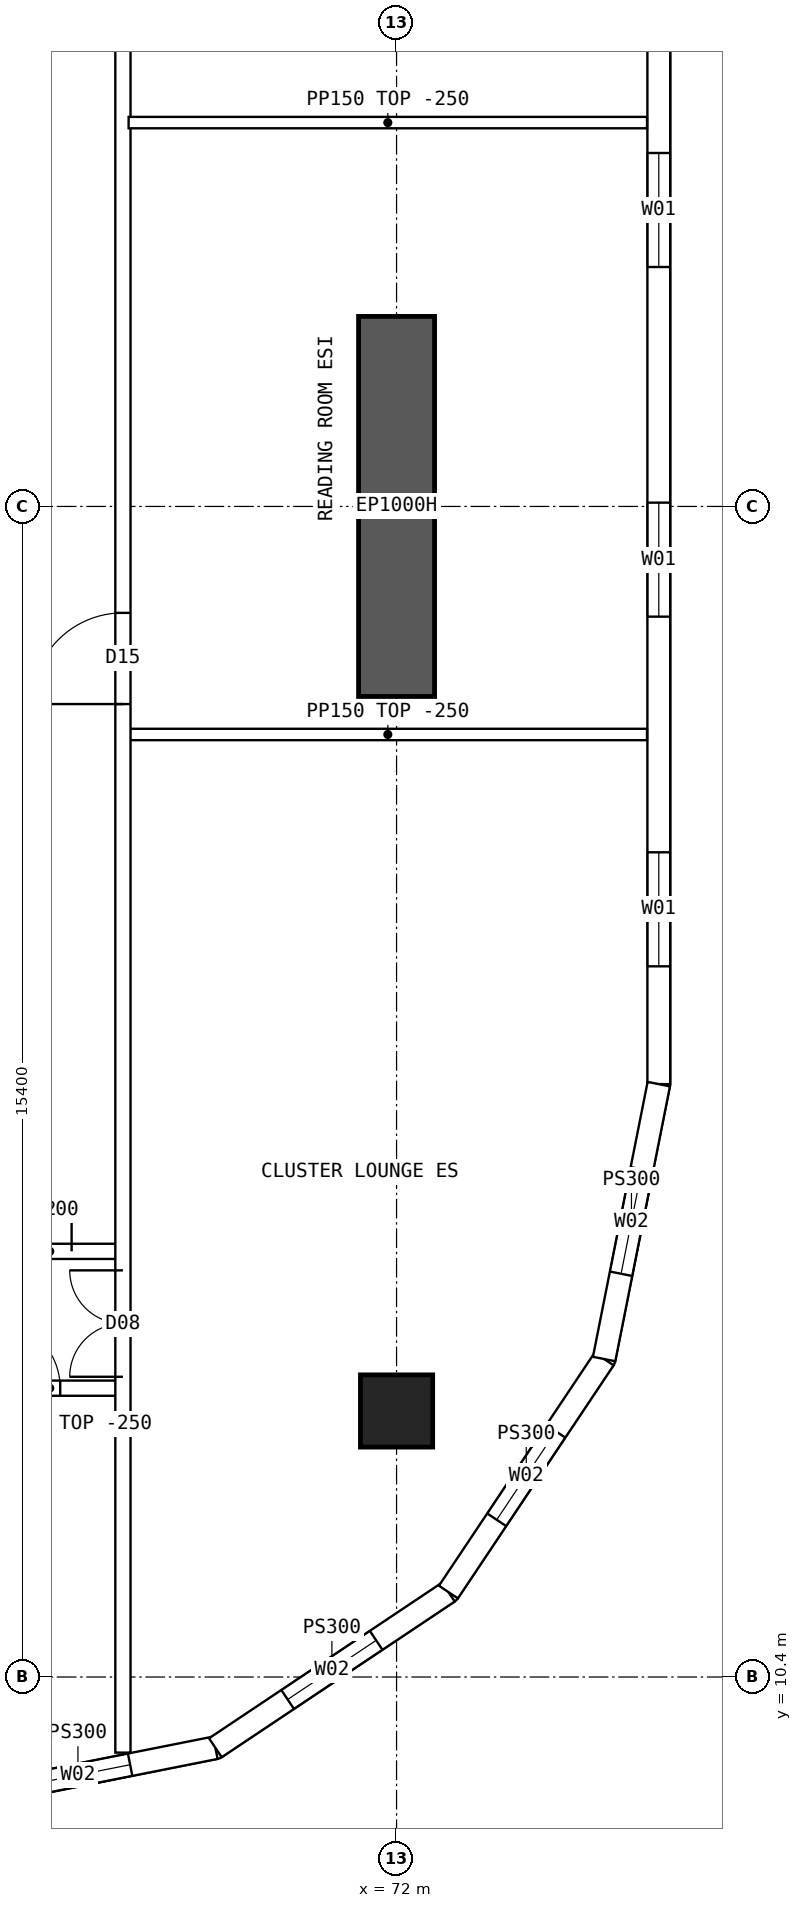
"""IFC4 building model, lengths in metres.
Left out: names, types, materials, properties, quantities, classifications, styles, units other than length and angle.
Written with IfcOpenShell. Run it as: python <this file> out.ifc"""

import sys

from ifc_helpers import new_model, si_unit, direction, frame, frame_2d, origin, origin_2d, place, context, subcontext, project, spatial, polyline, rectangle, hollow_rectangle, outline, extrude, element, fill, save


model = new_model("IFC4")
c1 = context("Model", 3, precision=1e-05, world=origin(), true_north=direction((0.0, 1.0)))
c2 = subcontext(c1, "Body", "Model", "MODEL_VIEW")
j1 = project(units=[si_unit("LENGTHUNIT", "METRE"), si_unit("PLANEANGLEUNIT", "RADIAN")], contexts=[c1])
p1 = place(None, origin())
s1 = spatial("IfcSite", under=j1, at=p1, CompositionType="ELEMENT")
p2 = place(p1, origin())
s2 = spatial("IfcBuilding", under=s1, at=p2, CompositionType="ELEMENT")
p3 = place(p2, frame((0.0, 0.0, 121.9)))
s3 = spatial("IfcBuildingStorey", under=s2, at=p3, CompositionType="ELEMENT", Elevation=121.9)
p4 = place(p3, frame((72.0, 13.9, 0.0), z_axis=(0.0, 0.0, 1.0), x_axis=(1.0, 0.0, 0.0)))
e1 = element("IfcColumn", 1, at=p4, inside=s3, PredefinedType="COLUMN", context=c2, shape_type="SweptSolid", body=[
    extrude(hollow_rectangle(XDim=0.95, YDim=0.95, WallThickness=0.095, at=origin_2d()), origin(), (0.0, 0.0, 1.0), 3.75),
])
p5 = place(p3, frame((72.0, 23.3, 0.0), z_axis=(0.0, 0.0, 1.0), x_axis=(0.0, 1.0, 0.0)))
e2 = element("IfcWall", 2, at=p5, inside=s3, PredefinedType="SHEAR", context=c2, shape_type="SweptSolid", body=[
    extrude(rectangle(XDim=5.0, YDim=1.0, at=frame_2d((2.5, 0.0))), origin(), (0.0, 0.0, 1.0), 3.75),
])
p6 = place(p3, frame((75.45, 18.2, 0.0), z_axis=(0.0, 0.0, 1.0), x_axis=(0.0, 1.0, 0.0)))
e3 = element("IfcWall", 3, at=p6, inside=s3, PredefinedType="SOLIDWALL", context=c2, shape_type="SweptSolid", body=[
    extrude(outline(polyline([(-0.015, -0.15), (27.615, -0.15), (27.585, 0.15), (0.015, 0.15), (-0.015, -0.15)])), origin(), (0.0, 0.0, 1.0), 3.5),
])
p7 = place(p6, frame((1.55, 0.0, 0.9)))
e4 = element("IfcOpeningElement", 4, at=p7, cuts=e3, PredefinedType="OPENING", context=c2, shape_type="SweptSolid", body=[
    extrude(rectangle(XDim=1.5, YDim=2.0, at=frame_2d((0.75, 1.0))), frame((0.0, 0.16, 0.0), z_axis=(0.0, -1.0, 0.0), x_axis=(1.0, 0.0, 0.0)), (0.0, 0.0, 1.0), 0.32),
])
p8 = place(p6, frame((6.15, 0.0, 0.9)))
e5 = element("IfcOpeningElement", 5, at=p8, cuts=e3, PredefinedType="OPENING", context=c2, shape_type="SweptSolid", body=[
    extrude(rectangle(XDim=1.5, YDim=2.0, at=frame_2d((0.75, 1.0))), frame((0.0, 0.16, 0.0), z_axis=(0.0, -1.0, 0.0), x_axis=(1.0, 0.0, 0.0)), (0.0, 0.0, 1.0), 0.32),
])
p9 = place(p6, frame((10.75, 0.0, 0.9)))
e6 = element("IfcOpeningElement", 6, at=p9, cuts=e3, PredefinedType="OPENING", context=c2, shape_type="SweptSolid", body=[
    extrude(rectangle(XDim=1.5, YDim=2.0, at=frame_2d((0.75, 1.0))), frame((0.0, 0.16, 0.0), z_axis=(0.0, -1.0, 0.0), x_axis=(1.0, 0.0, 0.0)), (0.0, 0.0, 1.0), 0.32),
])
p10 = place(p6, frame((15.35, 0.0, 0.9)))
e7 = element("IfcOpeningElement", 7, at=p10, cuts=e3, PredefinedType="OPENING", context=c2, shape_type="SweptSolid", body=[
    extrude(rectangle(XDim=1.5, YDim=2.0, at=frame_2d((0.75, 1.0))), frame((0.0, 0.16, 0.0), z_axis=(0.0, -1.0, 0.0), x_axis=(1.0, 0.0, 0.0)), (0.0, 0.0, 1.0), 0.32),
])
p11 = place(p6, frame((19.95, 0.0, 0.9)))
e8 = element("IfcOpeningElement", 8, at=p11, cuts=e3, PredefinedType="OPENING", context=c2, shape_type="SweptSolid", body=[
    extrude(rectangle(XDim=1.5, YDim=2.0, at=frame_2d((0.75, 1.0))), frame((0.0, 0.16, 0.0), z_axis=(0.0, -1.0, 0.0), x_axis=(1.0, 0.0, 0.0)), (0.0, 0.0, 1.0), 0.32),
])
p12 = place(p6, frame((24.55, 0.0, 0.9)))
e9 = element("IfcOpeningElement", 9, at=p12, cuts=e3, PredefinedType="OPENING", context=c2, shape_type="SweptSolid", body=[
    extrude(rectangle(XDim=1.5, YDim=2.0, at=frame_2d((0.75, 1.0))), frame((0.0, 0.16, 0.0), z_axis=(0.0, -1.0, 0.0), x_axis=(1.0, 0.0, 0.0)), (0.0, 0.0, 1.0), 0.32),
])
p13 = place(p3, frame((66.0, 8.75, 0.0), z_axis=(0.0, 0.0, 1.0), x_axis=(0.980791473772, 0.195059183267, 0.0)))
e10 = element("IfcWall", 10, at=p13, inside=s3, PredefinedType="SOLIDWALL", context=c2, shape_type="SweptSolid", body=[
    extrude(outline(polyline([(-0.03, -0.15), (3.717, -0.15), (3.657, 0.15), (0.03, 0.15), (-0.03, -0.15)])), origin(), (0.0, 0.0, 1.0), 3.5),
])
p14 = place(p13, frame((1.144, 0.0, 0.9)))
e11 = element("IfcOpeningElement", 11, at=p14, cuts=e10, PredefinedType="OPENING", context=c2, shape_type="SweptSolid", body=[
    extrude(rectangle(XDim=1.4, YDim=1.8, at=frame_2d((0.7, 0.9))), frame((0.0, 0.16, 0.0), z_axis=(0.0, -1.0, 0.0), x_axis=(1.0, 0.0, 0.0)), (0.0, 0.0, 1.0), 0.32),
])
p15 = place(p3, frame((69.616, 9.469, 0.0), z_axis=(0.0, 0.0, 1.0), x_axis=(0.831448786846, 0.555601399253, 0.0)))
e12 = element("IfcWall", 12, at=p15, inside=s3, PredefinedType="SOLIDWALL", context=c2, shape_type="SweptSolid", body=[
    extrude(outline(polyline([(-0.03, -0.15), (3.717, -0.15), (3.657, 0.15), (0.03, 0.15), (-0.03, -0.15)])), origin(), (0.0, 0.0, 1.0), 3.5),
])
p16 = place(p15, frame((1.144, 0.0, 0.9)))
e13 = element("IfcOpeningElement", 13, at=p16, cuts=e12, PredefinedType="OPENING", context=c2, shape_type="SweptSolid", body=[
    extrude(rectangle(XDim=1.4, YDim=1.8, at=frame_2d((0.7, 0.9))), frame((0.0, 0.16, 0.0), z_axis=(0.0, -1.0, 0.0), x_axis=(1.0, 0.0, 0.0)), (0.0, 0.0, 1.0), 0.32),
])
p17 = place(p3, frame((72.682, 11.518, 0.0), z_axis=(0.0, 0.0, 1.0), x_axis=(0.555601399253, 0.831448786846, 0.0)))
e14 = element("IfcWall", 14, at=p17, inside=s3, PredefinedType="SOLIDWALL", context=c2, shape_type="SweptSolid", body=[
    extrude(outline(polyline([(-0.03, -0.15), (3.717, -0.15), (3.657, 0.15), (0.03, 0.15), (-0.03, -0.15)])), origin(), (0.0, 0.0, 1.0), 3.5),
])
p18 = place(p17, frame((1.144, 0.0, 0.9)))
e15 = element("IfcOpeningElement", 15, at=p18, cuts=e14, PredefinedType="OPENING", context=c2, shape_type="SweptSolid", body=[
    extrude(rectangle(XDim=1.4, YDim=1.8, at=frame_2d((0.7, 0.9))), frame((0.0, 0.16, 0.0), z_axis=(0.0, -1.0, 0.0), x_axis=(1.0, 0.0, 0.0)), (0.0, 0.0, 1.0), 0.32),
])
p19 = place(p3, frame((74.731, 14.583, 0.0), z_axis=(0.0, 0.0, 1.0), x_axis=(0.195059183267, 0.980791473772, 0.0)))
e16 = element("IfcWall", 16, at=p19, inside=s3, PredefinedType="SOLIDWALL", context=c2, shape_type="SweptSolid", body=[
    extrude(outline(polyline([(-0.03, -0.15), (3.702, -0.15), (3.672, 0.15), (0.03, 0.15), (-0.03, -0.15)])), origin(), (0.0, 0.0, 1.0), 3.5),
])
p20 = place(p19, frame((1.144, 0.0, 0.9)))
e17 = element("IfcOpeningElement", 17, at=p20, cuts=e16, PredefinedType="OPENING", context=c2, shape_type="SweptSolid", body=[
    extrude(rectangle(XDim=1.4, YDim=1.8, at=frame_2d((0.7, 0.9))), frame((0.0, 0.16, 0.0), z_axis=(0.0, -1.0, 0.0), x_axis=(1.0, 0.0, 0.0)), (0.0, 0.0, 1.0), 0.32),
])
p21 = place(p3, frame((66.475, 14.2, 0.0), z_axis=(0.0, 0.0, 1.0), x_axis=(1.0, 0.0, 0.0)))
e18 = element("IfcWall", 18, at=p21, inside=s3, PredefinedType="SOLIDWALL", context=c2, shape_type="SweptSolid", body=[
    extrude(rectangle(XDim=1.925, YDim=0.2, at=frame_2d((0.962, 0.0))), origin(), (0.0, 0.0, 1.0), 3.5),
])
p22 = place(p21, frame((0.2, 0.0, 0.0)))
e19 = element("IfcOpeningElement", 19, at=p22, cuts=e18, PredefinedType="OPENING", context=c2, shape_type="SweptSolid", body=[
    extrude(rectangle(XDim=0.9, YDim=2.1, at=frame_2d((0.45, 1.05))), frame((0.0, 0.11, 0.0), z_axis=(0.0, -1.0, 0.0), x_axis=(1.0, 0.0, 0.0)), (0.0, 0.0, 1.0), 0.22),
])
p23 = place(p3, frame((66.475, 16.0, 0.0), z_axis=(0.0, 0.0, 1.0), x_axis=(1.0, 0.0, 0.0)))
e20 = element("IfcWall", 20, at=p23, inside=s3, PredefinedType="SOLIDWALL", context=c2, shape_type="SweptSolid", body=[
    extrude(rectangle(XDim=1.925, YDim=0.2, at=frame_2d((0.962, 0.0))), origin(), (0.0, 0.0, 1.0), 3.5),
])
p24 = place(p23, frame((0.05, 0.0, 0.0)))
e21 = element("IfcOpeningElement", 21, at=p24, cuts=e20, PredefinedType="OPENING", context=c2, shape_type="SweptSolid", body=[
    extrude(rectangle(XDim=1.2, YDim=2.1, at=frame_2d((0.6, 1.05))), frame((0.0, 0.11, 0.0), z_axis=(0.0, -1.0, 0.0), x_axis=(1.0, 0.0, 0.0)), (0.0, 0.0, 1.0), 0.22),
])
p25 = place(p3, frame((68.475, 30.85, 0.0), z_axis=(0.0, 0.0, 1.0), x_axis=(1.0, 0.0, 0.0)))
e22 = element("IfcWall", 22, at=p25, inside=s3, PredefinedType="PARTITIONING", context=c2, shape_type="SweptSolid", body=[
    extrude(outline(polyline([(0.0, 0.0), (6.82, 0.0), (6.82, 3.5), (3.827, 3.5), (3.825, 3.05), (3.227, 3.05), (3.225, 3.5), (0.0, 3.5), (0.0, 0.0)])), frame((0.0, 0.075, 0.0), z_axis=(0.0, -1.0, 0.0), x_axis=(1.0, 0.0, 0.0)), (0.0, 0.0, 1.0), 0.15),
])
p26 = place(p3, frame((68.4, 9.405, 0.0), z_axis=(0.0, 0.0, 1.0), x_axis=(0.0, 1.0, 0.0)))
e23 = element("IfcWall", 23, at=p26, inside=s3, PredefinedType="SOLIDWALL", context=c2, shape_type="SweptSolid", body=[
    extrude(rectangle(XDim=45.189, YDim=0.2, at=frame_2d((22.595, 0.0))), origin(), (0.0, 0.0, 1.0), 3.5),
])
p27 = place(p26, frame((13.795, 0.0, 0.0)))
e24 = element("IfcOpeningElement", 24, at=p27, cuts=e23, PredefinedType="OPENING", context=c2, shape_type="SweptSolid", body=[
    extrude(rectangle(XDim=1.2, YDim=2.1, at=frame_2d((0.6, 1.05))), frame((0.0, 0.11, 0.0), z_axis=(0.0, -1.0, 0.0), x_axis=(1.0, 0.0, 0.0)), (0.0, 0.0, 1.0), 0.22),
])
p28 = place(p26, frame((4.945, 0.0, 0.0)))
e25 = element("IfcOpeningElement", 25, at=p28, cuts=e23, PredefinedType="OPENING", context=c2, shape_type="SweptSolid", body=[
    extrude(rectangle(XDim=1.4, YDim=2.1, at=frame_2d((0.7, 1.05))), frame((0.0, 0.11, 0.0), z_axis=(0.0, -1.0, 0.0), x_axis=(1.0, 0.0, 0.0)), (0.0, 0.0, 1.0), 0.22),
])
p29 = place(p26, frame((38.745, 0.0, 0.0)))
e26 = element("IfcOpeningElement", 26, at=p29, cuts=e23, PredefinedType="OPENING", context=c2, shape_type="SweptSolid", body=[
    extrude(rectangle(XDim=1.4, YDim=2.1, at=frame_2d((0.7, 1.05))), frame((0.0, 0.11, 0.0), z_axis=(0.0, -1.0, 0.0), x_axis=(1.0, 0.0, 0.0)), (0.0, 0.0, 1.0), 0.22),
])
p30 = place(p3, frame((68.475, 22.8, 0.0), z_axis=(0.0, 0.0, 1.0), x_axis=(1.0, 0.0, 0.0)))
e27 = element("IfcWall", 27, at=p30, inside=s3, PredefinedType="PARTITIONING", context=c2, shape_type="SweptSolid", body=[
    extrude(outline(polyline([(0.0, 0.0), (6.82, 0.0), (6.82, 3.5), (3.827, 3.5), (3.825, 3.05), (3.227, 3.05), (3.225, 3.5), (0.0, 3.5), (0.0, 0.0)])), frame((0.0, 0.075, 0.0), z_axis=(0.0, -1.0, 0.0), x_axis=(1.0, 0.0, 0.0)), (0.0, 0.0, 1.0), 0.15),
])
p31 = place(p7, origin())
e28 = element("IfcWindow", 28, at=p31, inside=s3, PartitioningType="SINGLE_PANEL", PredefinedType="WINDOW", context=c2, shape_type="SweptSolid", body=[
    extrude(rectangle(XDim=1.5, YDim=2.0, at=frame_2d((0.75, 1.0))), frame((0.0, 0.03, 0.0), z_axis=(0.0, -1.0, 0.0), x_axis=(1.0, 0.0, 0.0)), (0.0, 0.0, 1.0), 0.06),
])
fill(e4, e28)
p32 = place(p8, origin())
e29 = element("IfcWindow", 29, at=p32, inside=s3, PartitioningType="SINGLE_PANEL", PredefinedType="WINDOW", context=c2, shape_type="SweptSolid", body=[
    extrude(rectangle(XDim=1.5, YDim=2.0, at=frame_2d((0.75, 1.0))), frame((0.0, 0.03, 0.0), z_axis=(0.0, -1.0, 0.0), x_axis=(1.0, 0.0, 0.0)), (0.0, 0.0, 1.0), 0.06),
])
fill(e5, e29)
p33 = place(p9, origin())
e30 = element("IfcWindow", 30, at=p33, inside=s3, PartitioningType="SINGLE_PANEL", PredefinedType="WINDOW", context=c2, shape_type="SweptSolid", body=[
    extrude(rectangle(XDim=1.5, YDim=2.0, at=frame_2d((0.75, 1.0))), frame((0.0, 0.03, 0.0), z_axis=(0.0, -1.0, 0.0), x_axis=(1.0, 0.0, 0.0)), (0.0, 0.0, 1.0), 0.06),
])
fill(e6, e30)
p34 = place(p14, origin())
e31 = element("IfcWindow", 31, at=p34, inside=s3, PartitioningType="SINGLE_PANEL", PredefinedType="WINDOW", context=c2, shape_type="SweptSolid", body=[
    extrude(rectangle(XDim=1.4, YDim=1.8, at=frame_2d((0.7, 0.9))), frame((0.0, 0.03, 0.0), z_axis=(0.0, -1.0, 0.0), x_axis=(1.0, 0.0, 0.0)), (0.0, 0.0, 1.0), 0.06),
])
fill(e11, e31)
p35 = place(p16, origin())
e32 = element("IfcWindow", 32, at=p35, inside=s3, PartitioningType="SINGLE_PANEL", PredefinedType="WINDOW", context=c2, shape_type="SweptSolid", body=[
    extrude(rectangle(XDim=1.4, YDim=1.8, at=frame_2d((0.7, 0.9))), frame((0.0, 0.03, 0.0), z_axis=(0.0, -1.0, 0.0), x_axis=(1.0, 0.0, 0.0)), (0.0, 0.0, 1.0), 0.06),
])
fill(e13, e32)
p36 = place(p18, origin())
e33 = element("IfcWindow", 33, at=p36, inside=s3, PartitioningType="SINGLE_PANEL", PredefinedType="WINDOW", context=c2, shape_type="SweptSolid", body=[
    extrude(rectangle(XDim=1.4, YDim=1.8, at=frame_2d((0.7, 0.9))), frame((0.0, 0.03, 0.0), z_axis=(0.0, -1.0, 0.0), x_axis=(1.0, 0.0, 0.0)), (0.0, 0.0, 1.0), 0.06),
])
fill(e15, e33)
p37 = place(p20, origin())
e34 = element("IfcWindow", 34, at=p37, inside=s3, PartitioningType="SINGLE_PANEL", PredefinedType="WINDOW", context=c2, shape_type="SweptSolid", body=[
    extrude(rectangle(XDim=1.4, YDim=1.8, at=frame_2d((0.7, 0.9))), frame((0.0, 0.03, 0.0), z_axis=(0.0, -1.0, 0.0), x_axis=(1.0, 0.0, 0.0)), (0.0, 0.0, 1.0), 0.06),
])
fill(e17, e34)
p38 = place(p24, origin())
e35 = element("IfcDoor", 35, at=p38, inside=s3, OperationType="DOUBLE_DOOR_SINGLE_SWING", PredefinedType="DOOR", context=c2, shape_type="SweptSolid", body=[
    extrude(rectangle(XDim=1.2, YDim=2.1, at=frame_2d((0.6, 1.05))), frame((0.0, 0.025, 0.0), z_axis=(0.0, -1.0, 0.0), x_axis=(1.0, 0.0, 0.0)), (0.0, 0.0, 1.0), 0.05),
])
fill(e21, e35)
p39 = place(p27, origin())
e36 = element("IfcDoor", 36, at=p39, inside=s3, OperationType="SINGLE_SWING_LEFT", PredefinedType="DOOR", context=c2, shape_type="SweptSolid", body=[
    extrude(rectangle(XDim=1.2, YDim=2.1, at=frame_2d((0.6, 1.05))), frame((0.0, 0.025, 0.0), z_axis=(0.0, -1.0, 0.0), x_axis=(1.0, 0.0, 0.0)), (0.0, 0.0, 1.0), 0.05),
])
fill(e24, e36)
p40 = place(p28, origin())
e37 = element("IfcDoor", 37, at=p40, inside=s3, OperationType="DOUBLE_DOOR_SINGLE_SWING", PredefinedType="DOOR", context=c2, shape_type="SweptSolid", body=[
    extrude(rectangle(XDim=1.4, YDim=2.1, at=frame_2d((0.7, 1.05))), frame((0.0, 0.025, 0.0), z_axis=(0.0, -1.0, 0.0), x_axis=(1.0, 0.0, 0.0)), (0.0, 0.0, 1.0), 0.05),
])
fill(e25, e37)
p41 = place(p22, origin())
e38 = element("IfcDoor", 38, at=p41, inside=s3, OperationType="SINGLE_SWING_LEFT", PredefinedType="DOOR", context=c2, shape_type="SweptSolid", body=[
    extrude(rectangle(XDim=0.9, YDim=2.1, at=frame_2d((0.45, 1.05))), frame((0.0, 0.025, 0.0), z_axis=(0.0, -1.0, 0.0), x_axis=(1.0, 0.0, 0.0)), (0.0, 0.0, 1.0), 0.05),
])
fill(e19, e38)
save(model, sys.argv[1])
